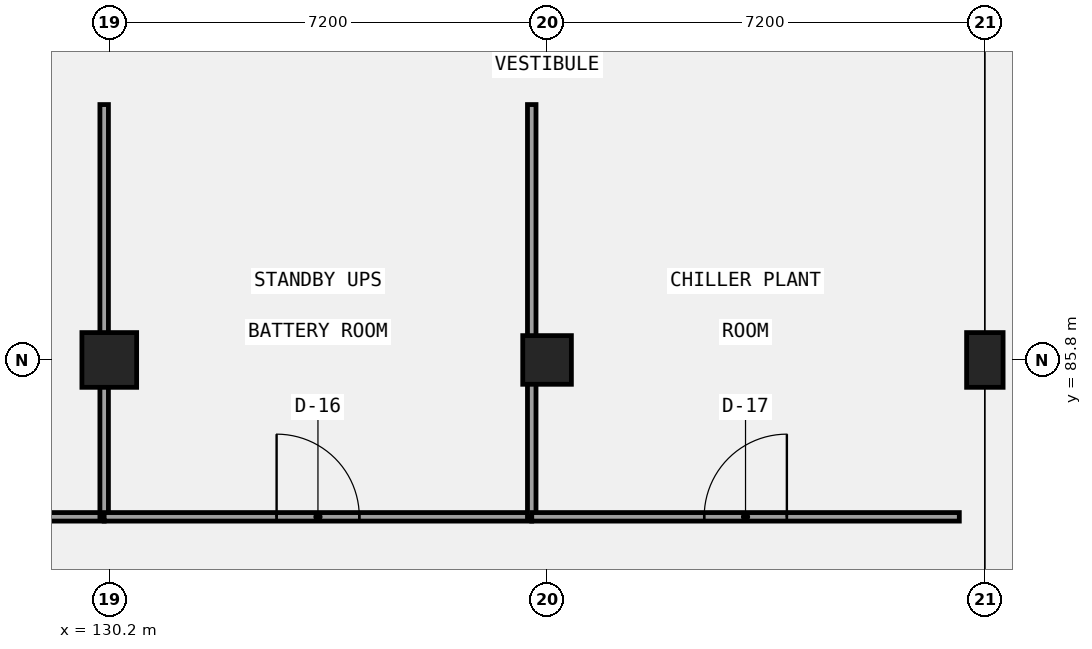
"""IFC4 building model, lengths in metres.
Left out: names, types, materials, properties, quantities, classifications, styles, units other than length and angle.
Written with IfcOpenShell. Run it as: python <this file> out.ifc"""

import sys

from ifc_helpers import new_model, si_unit, direction, frame, frame_2d, origin, origin_2d, place, context, subcontext, project, spatial, rectangle, extrude, element, fill, save


model = new_model("IFC4")
c1 = context("Model", 3, precision=1e-05, world=origin(), true_north=direction((0.0, 1.0)))
c2 = subcontext(c1, "Body", "Model", "MODEL_VIEW")
j1 = project(units=[si_unit("LENGTHUNIT", "METRE"), si_unit("PLANEANGLEUNIT", "RADIAN")], contexts=[c1])
p1 = place(None, origin())
s1 = spatial("IfcSite", under=j1, at=p1, CompositionType="ELEMENT")
p2 = place(p1, origin())
s2 = spatial("IfcBuilding", under=s1, at=p2, CompositionType="ELEMENT")
p3 = place(p2, frame((0.0, 0.0, -8.4)))
s3 = spatial("IfcBuildingStorey", under=s2, at=p3, CompositionType="ELEMENT", Elevation=-8.4)
p4 = place(p3, frame((130.2, 85.8, 0.0), z_axis=(0.0, 0.0, 1.0), x_axis=(1.0, 0.0, 0.0)))
e1 = element("IfcColumn", 1, at=p4, inside=s3, PredefinedType="COLUMN", context=c2, shape_type="SweptSolid", body=[
    extrude(rectangle(XDim=0.9, YDim=0.9, at=origin_2d()), origin(), (0.0, 0.0, 1.0), 4.2),
])
p5 = place(p3, frame((137.4, 85.8, 0.0), z_axis=(0.0, 0.0, 1.0), x_axis=(1.0, 0.0, 0.0)))
e2 = element("IfcColumn", 2, at=p5, inside=s3, PredefinedType="COLUMN", context=c2, shape_type="SweptSolid", body=[
    extrude(rectangle(XDim=0.8, YDim=0.8, at=origin_2d()), origin(), (0.0, 0.0, 1.0), 4.2),
])
p6 = place(p3, frame((144.6, 85.8, 0.0), z_axis=(0.0, 0.0, 1.0), x_axis=(1.0, 0.0, 0.0)))
e3 = element("IfcColumn", 3, at=p6, inside=s3, PredefinedType="COLUMN", context=c2, shape_type="SweptSolid", body=[
    extrude(rectangle(XDim=0.6, YDim=0.9, at=origin_2d()), origin(), (0.0, 0.0, 1.0), 4.2),
])
p7 = place(p3, frame((123.084, 83.22, 0.0), z_axis=(0.0, 0.0, 1.0), x_axis=(1.0, 0.0, 0.0)))
e4 = element("IfcWall", 4, at=p7, inside=s3, PredefinedType="PARTITIONING", context=c2, shape_type="SweptSolid", body=[
    extrude(rectangle(XDim=7.032, YDim=0.14, at=frame_2d((3.516, 0.0))), origin(), (0.0, 0.0, 1.0), 3.9),
])
p8 = place(p7, frame((2.906, 0.0, 0.0)))
e5 = element("IfcOpeningElement", 5, at=p8, cuts=e4, PredefinedType="OPENING", context=c2, shape_type="SweptSolid", body=[
    extrude(rectangle(XDim=1.22, YDim=2.35, at=frame_2d((0.61, 1.175))), frame((0.0, 0.08, 0.0), z_axis=(0.0, -1.0, 0.0), x_axis=(1.0, 0.0, 0.0)), (0.0, 0.0, 1.0), 0.16),
])
p9 = place(p3, frame((130.116, 83.22, 0.0), z_axis=(0.0, 0.0, 1.0), x_axis=(0.0, 1.0, 0.0)))
e6 = element("IfcWall", 6, at=p9, inside=s3, PredefinedType="PARTITIONING", context=c2, shape_type="SweptSolid", body=[
    extrude(rectangle(XDim=6.78, YDim=0.14, at=frame_2d((3.39, 0.0))), origin(), (0.0, 0.0, 1.0), 3.05),
])
p10 = place(p3, frame((130.116, 83.22, 0.0), z_axis=(0.0, 0.0, 1.0), x_axis=(1.0, 0.0, 0.0)))
e7 = element("IfcWall", 7, at=p10, inside=s3, PredefinedType="PARTITIONING", context=c2, shape_type="SweptSolid", body=[
    extrude(rectangle(XDim=7.032, YDim=0.14, at=frame_2d((3.516, 0.0))), origin(), (0.0, 0.0, 1.0), 3.9),
])
p11 = place(p10, frame((2.836, 0.0, 0.0)))
e8 = element("IfcOpeningElement", 8, at=p11, cuts=e7, PredefinedType="OPENING", context=c2, shape_type="SweptSolid", body=[
    extrude(rectangle(XDim=1.36, YDim=2.1, at=frame_2d((0.68, 1.05))), frame((0.0, 0.08, 0.0), z_axis=(0.0, -1.0, 0.0), x_axis=(1.0, 0.0, 0.0)), (0.0, 0.0, 1.0), 0.16),
])
p12 = place(p3, frame((137.148, 83.22, 0.0), z_axis=(0.0, 0.0, 1.0), x_axis=(0.0, 1.0, 0.0)))
e9 = element("IfcWall", 9, at=p12, inside=s3, PredefinedType="PARTITIONING", context=c2, shape_type="SweptSolid", body=[
    extrude(rectangle(XDim=6.78, YDim=0.14, at=frame_2d((3.39, 0.0))), origin(), (0.0, 0.0, 1.0), 3.0),
])
p13 = place(p3, frame((137.148, 83.22, 0.0), z_axis=(0.0, 0.0, 1.0), x_axis=(1.0, 0.0, 0.0)))
e10 = element("IfcWall", 10, at=p13, inside=s3, PredefinedType="PARTITIONING", context=c2, shape_type="SweptSolid", body=[
    extrude(rectangle(XDim=7.032, YDim=0.14, at=frame_2d((3.516, 0.0))), origin(), (0.0, 0.0, 1.0), 3.9),
])
p14 = place(p13, frame((2.836, 0.0, 0.0)))
e11 = element("IfcOpeningElement", 11, at=p14, cuts=e10, PredefinedType="OPENING", context=c2, shape_type="SweptSolid", body=[
    extrude(rectangle(XDim=1.36, YDim=2.22, at=frame_2d((0.68, 1.11))), frame((0.0, 0.08, 0.0), z_axis=(0.0, -1.0, 0.0), x_axis=(1.0, 0.0, 0.0)), (0.0, 0.0, 1.0), 0.16),
])
p15 = place(p11, origin())
e12 = element("IfcDoor", 12, at=p15, inside=s3, OperationType="SINGLE_SWING_LEFT", PredefinedType="DOOR", context=c2, shape_type="SweptSolid", body=[
    extrude(rectangle(XDim=1.36, YDim=2.1, at=frame_2d((0.68, 1.05))), frame((0.0, 0.025, 0.0), z_axis=(0.0, -1.0, 0.0), x_axis=(1.0, 0.0, 0.0)), (0.0, 0.0, 1.0), 0.05),
])
fill(e8, e12)
p16 = place(p14, origin())
e13 = element("IfcDoor", 13, at=p16, inside=s3, OperationType="SINGLE_SWING_RIGHT", PredefinedType="DOOR", context=c2, shape_type="SweptSolid", body=[
    extrude(rectangle(XDim=1.36, YDim=2.22, at=frame_2d((0.68, 1.11))), frame((0.0, 0.025, 0.0), z_axis=(0.0, -1.0, 0.0), x_axis=(1.0, 0.0, 0.0)), (0.0, 0.0, 1.0), 0.05),
])
fill(e11, e13)
save(model, sys.argv[1])
